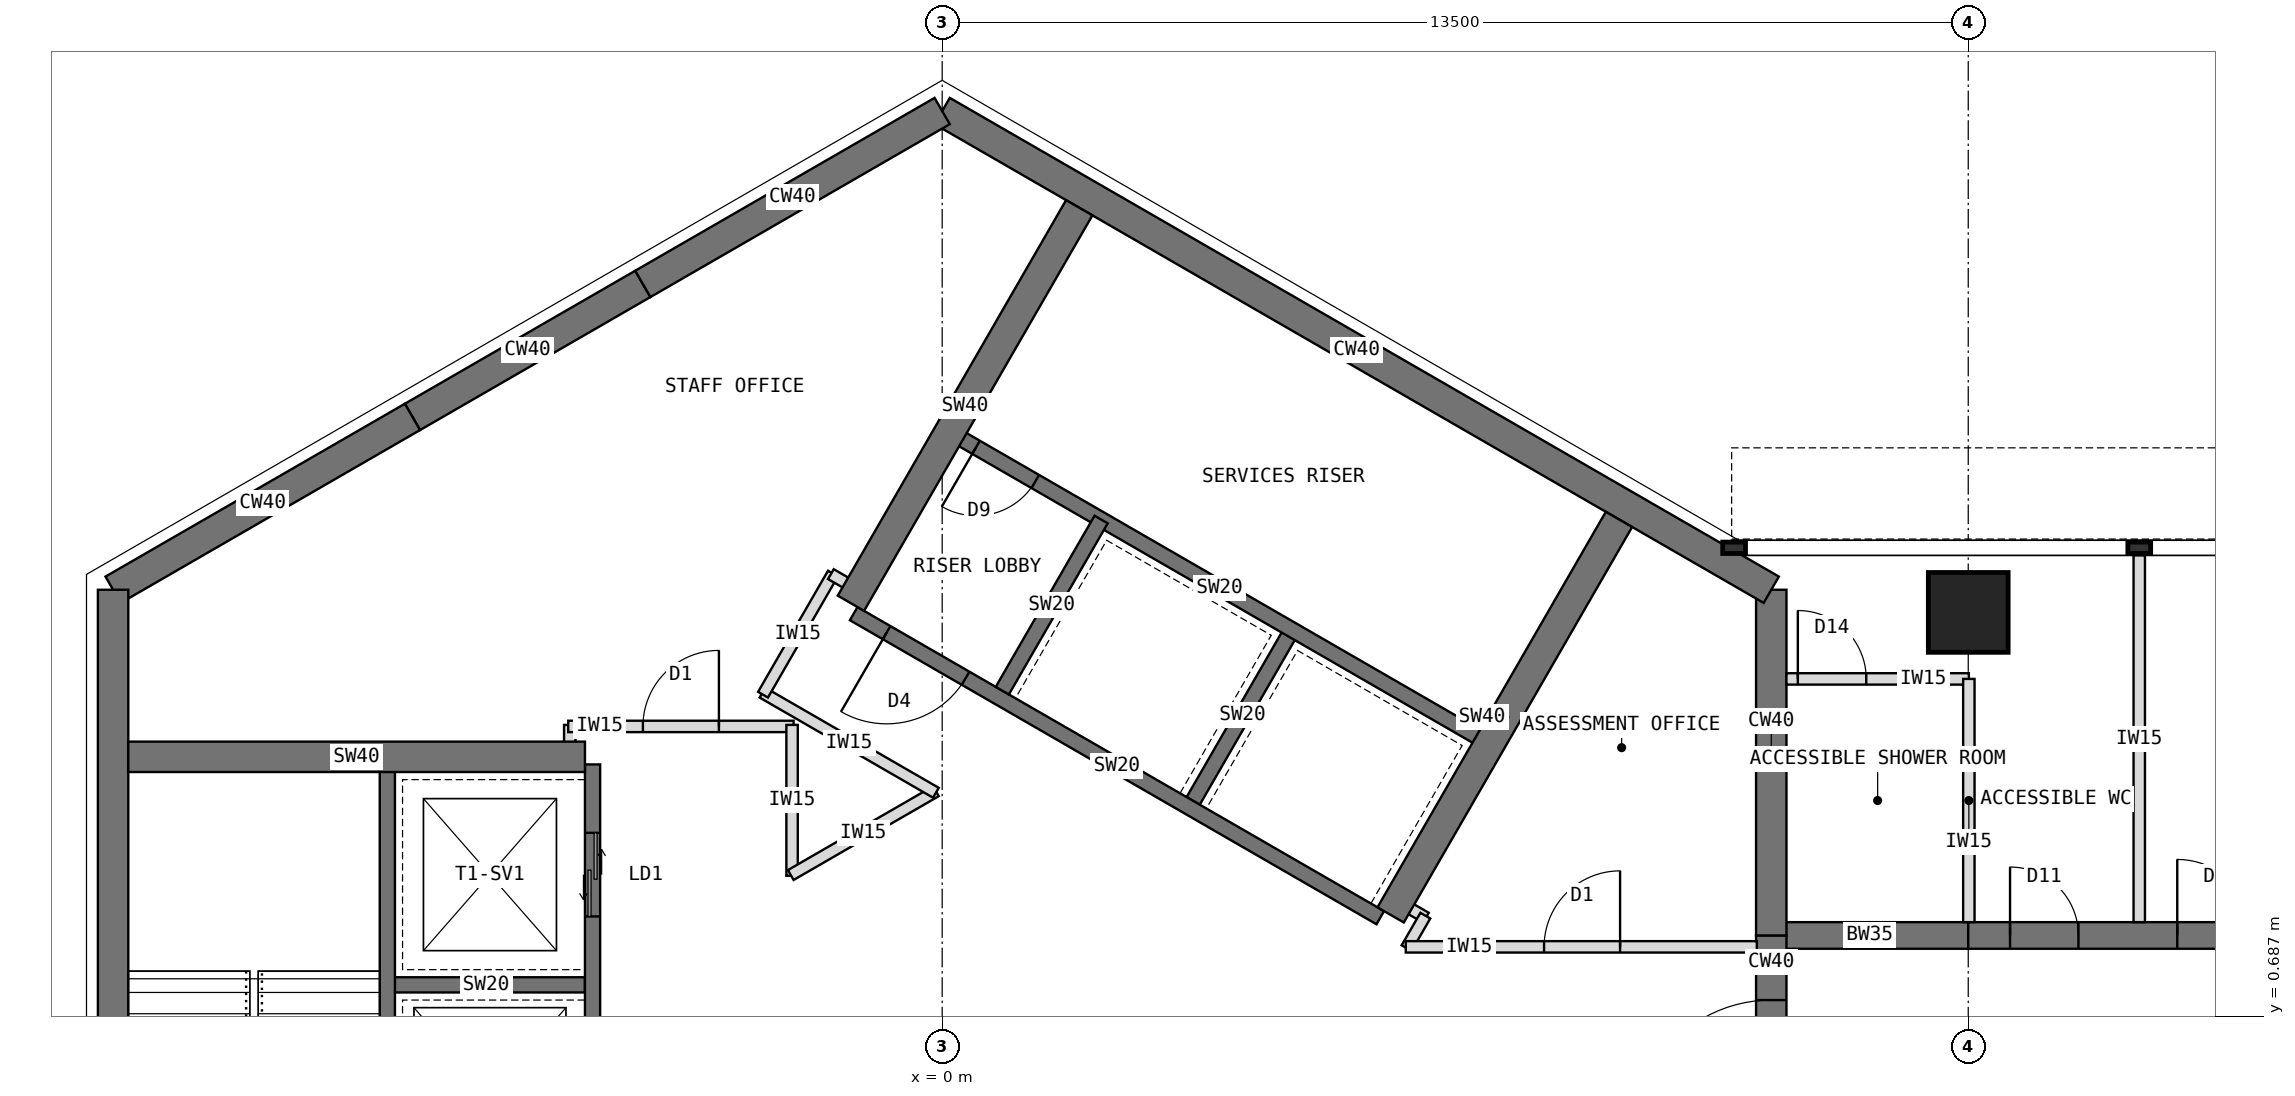
"""IFC4 building model, lengths in metres.
Left out: names, types, materials, properties, quantities, classifications, styles, units other than length and angle.
Written with IfcOpenShell. Run it as: python <this file> out.ifc"""

import sys

from ifc_helpers import new_model, si_unit, direction, frame, frame_2d, origin, origin_2d, place, context, subcontext, project, spatial, rectangle, extrude, element, fill, save


model = new_model("IFC4")
c1 = context("Model", 3, precision=1e-05, world=origin(), true_north=direction((0.0, 1.0)))
c2 = subcontext(c1, "Body", "Model", "MODEL_VIEW")
j1 = project(units=[si_unit("LENGTHUNIT", "METRE"), si_unit("PLANEANGLEUNIT", "RADIAN")], contexts=[c1])
p1 = place(None, origin())
s1 = spatial("IfcSite", under=j1, at=p1, CompositionType="ELEMENT")
p2 = place(p1, origin())
s2 = spatial("IfcBuilding", under=s1, at=p2, CompositionType="ELEMENT")
p3 = place(p2, frame((0.0, 0.0, 247.5)))
s3 = spatial("IfcBuildingStorey", under=s2, at=p3, CompositionType="ELEMENT", Elevation=247.5)
p4 = place(p3, frame((10.908, -1.75, 0.0), z_axis=(0.0, 0.0, 1.0), x_axis=(0.0, 1.0, 0.0)))
e1 = element("IfcWall", 1, at=p4, inside=s3, PredefinedType="SHEAR", context=c2, shape_type="SweptSolid", body=[
    extrude(rectangle(XDim=3.5, YDim=0.4, at=frame_2d((1.75, 0.0))), origin(), (0.0, 0.0, 1.0), 4.0),
])
p5 = place(p4, frame((0.85, 0.0, 0.0)))
e2 = element("IfcOpeningElement", 2, at=p5, cuts=e1, PredefinedType="OPENING", context=c2, shape_type="SweptSolid", body=[
    extrude(rectangle(XDim=1.8, YDim=2.1, at=frame_2d((0.9, 1.05))), frame((0.0, 0.21, 0.0), z_axis=(0.0, -1.0, 0.0), x_axis=(1.0, 0.0, 0.0)), (0.0, 0.0, 1.0), 0.42),
])
p6 = place(p3, frame((10.908, 1.75, 0.0), z_axis=(0.0, 0.0, 1.0), x_axis=(0.0, 1.0, 0.0)))
e3 = element("IfcWall", 3, at=p6, inside=s3, PredefinedType="SHEAR", context=c2, shape_type="SweptSolid", body=[
    extrude(rectangle(XDim=4.548, YDim=0.4, at=frame_2d((2.274, 0.0))), origin(), (0.0, 0.0, 1.0), 4.0),
])
p7 = place(p3, frame((10.908, 6.298, 0.0), z_axis=(0.0, 0.0, 1.0), x_axis=(-0.866021940709, 0.500005998175, 0.0)))
e4 = element("IfcWall", 4, at=p7, inside=s3, PredefinedType="SHEAR", context=c2, shape_type="SweptSolid", body=[
    extrude(rectangle(XDim=12.596, YDim=0.4, at=frame_2d((6.298, 0.0))), origin(), (0.0, 0.0, 1.0), 4.0),
])
p8 = place(p3, frame((0.0, 12.596, 0.0), z_axis=(0.0, 0.0, 1.0), x_axis=(-0.866011268655, -0.500024481964, 0.0)))
e5 = element("IfcWall", 5, at=p8, inside=s3, PredefinedType="SHEAR", context=c2, shape_type="SweptSolid", body=[
    extrude(rectangle(XDim=4.548, YDim=0.4, at=frame_2d((2.274, 0.0))), origin(), (0.0, 0.0, 1.0), 4.0),
])
p9 = place(p3, frame((-3.939, 10.322, 0.0), z_axis=(0.0, 0.0, 1.0), x_axis=(-0.866019471182, -0.500010275428, 0.0)))
e6 = element("IfcWall", 6, at=p9, inside=s3, PredefinedType="SHEAR", context=c2, shape_type="SweptSolid", body=[
    extrude(rectangle(XDim=3.5, YDim=0.4, at=frame_2d((1.75, 0.0))), origin(), (0.0, 0.0, 1.0), 4.0),
])
p10 = place(p3, frame((-6.97, 8.572, 0.0), z_axis=(0.0, 0.0, 1.0), x_axis=(-0.866034513004, -0.499984222037, 0.0)))
e7 = element("IfcWall", 7, at=p10, inside=s3, PredefinedType="SHEAR", context=c2, shape_type="SweptSolid", body=[
    extrude(rectangle(XDim=4.548, YDim=0.4, at=frame_2d((2.274, 0.0))), origin(), (0.0, 0.0, 1.0), 4.0),
])
p11 = place(p3, frame((-10.908, 6.298, 0.0), z_axis=(0.0, 0.0, 1.0), x_axis=(0.0, -1.0, 0.0)))
e8 = element("IfcWall", 8, at=p11, inside=s3, PredefinedType="SHEAR", context=c2, shape_type="SweptSolid", body=[
    extrude(rectangle(XDim=12.596, YDim=0.4, at=frame_2d((6.298, 0.0))), origin(), (0.0, 0.0, 1.0), 4.0),
])
p12 = place(p3, frame((10.908, 1.75, 0.0), z_axis=(0.0, 0.0, 1.0), x_axis=(1.0, 0.0, 0.0)))
e9 = element("IfcWall", 9, at=p12, inside=s3, PredefinedType="SHEAR", context=c2, shape_type="SweptSolid", body=[
    extrude(rectangle(XDim=2.592, YDim=0.35, at=frame_2d((1.296, 0.0))), origin(), (0.0, 0.0, 1.0), 4.0),
])
p13 = place(p3, frame((13.5, 1.75, 0.0), z_axis=(0.0, 0.0, 1.0), x_axis=(1.0, 0.0, 0.0)))
e10 = element("IfcWall", 10, at=p13, inside=s3, PredefinedType="SHEAR", context=c2, shape_type="SweptSolid", body=[
    extrude(rectangle(XDim=13.2, YDim=0.35, at=frame_2d((6.6, 0.0))), origin(), (0.0, 0.0, 1.0), 4.0),
])
p14 = place(p13, frame((0.55, 0.0, 0.0)))
e11 = element("IfcOpeningElement", 11, at=p14, cuts=e10, PredefinedType="OPENING", context=c2, shape_type="SweptSolid", body=[
    extrude(rectangle(XDim=0.9, YDim=2.1, at=frame_2d((0.45, 1.05))), frame((0.0, 0.185, 0.0), z_axis=(0.0, -1.0, 0.0), x_axis=(1.0, 0.0, 0.0)), (0.0, 0.0, 1.0), 0.37),
])
p15 = place(p13, frame((2.75, 0.0, 0.0)))
e12 = element("IfcOpeningElement", 12, at=p15, cuts=e10, PredefinedType="OPENING", context=c2, shape_type="SweptSolid", body=[
    extrude(rectangle(XDim=1.0, YDim=2.1, at=frame_2d((0.5, 1.05))), frame((0.0, 0.185, 0.0), z_axis=(0.0, -1.0, 0.0), x_axis=(1.0, 0.0, 0.0)), (0.0, 0.0, 1.0), 0.37),
])
p16 = place(p13, frame((7.25, 0.0, 0.0)))
e13 = element("IfcOpeningElement", 13, at=p16, cuts=e10, PredefinedType="OPENING", context=c2, shape_type="SweptSolid", body=[
    extrude(rectangle(XDim=1.0, YDim=2.1, at=frame_2d((0.5, 1.05))), frame((0.0, 0.185, 0.0), z_axis=(0.0, -1.0, 0.0), x_axis=(1.0, 0.0, 0.0)), (0.0, 0.0, 1.0), 0.37),
])
p17 = place(p3, frame((13.5, 6.0, 0.0), z_axis=(0.0, 0.0, 1.0), x_axis=(1.0, 0.0, 0.0)))
e14 = element("IfcColumn", 14, at=p17, inside=s3, PredefinedType="COLUMN", context=c2, shape_type="SweptSolid", body=[
    extrude(rectangle(XDim=1.05, YDim=1.05, at=origin_2d()), origin(), (0.0, 0.0, 1.0), 4.0),
])
p18 = place(p3, frame((5.764, 1.984, 0.0), z_axis=(0.0, 0.0, 1.0), x_axis=(-0.866026010844, 0.49999894854, 0.0)))
e15 = element("IfcWall", 15, at=p18, inside=s3, PredefinedType="SHEAR", context=c2, shape_type="SweptSolid", body=[
    extrude(rectangle(XDim=8.0, YDim=0.2, at=frame_2d((4.0, 0.0))), origin(), (0.0, 0.0, 1.0), 4.0),
])
p19 = place(p18, frame((6.3, 0.0, 0.0)))
e16 = element("IfcOpeningElement", 16, at=p19, cuts=e15, PredefinedType="OPENING", context=c2, shape_type="SweptSolid", body=[
    extrude(rectangle(XDim=1.2, YDim=2.1, at=frame_2d((0.6, 1.05))), frame((0.0, 0.11, 0.0), z_axis=(0.0, -1.0, 0.0), x_axis=(1.0, 0.0, 0.0)), (0.0, 0.0, 1.0), 0.22),
])
for number, where, z_axis, x_axis in (
    (17, (3.303, 3.52, 0.0), (0.0, 0.0, 1.0), (0.5, 0.866, 0.0)),
    (18, (0.791, 4.97, 0.0), (0.0, 0.0, 1.0), (0.5, 0.866, 0.0)),
):
    element("IfcWall", number, at=place(p3, frame(where, z_axis=z_axis, x_axis=x_axis)), inside=s3, PredefinedType="SHEAR", context=c2, shape_type="SweptSolid", body=[
        extrude(rectangle(XDim=2.6, YDim=0.2, at=frame_2d((1.3, 0.0))), origin(), (0.0, 0.0, 1.0), 4.0),
    ])
p20 = place(p3, frame((7.114, 4.322, 0.0), z_axis=(0.0, 0.0, 1.0), x_axis=(-0.866026010844, 0.49999894854, 0.0)))
e19 = element("IfcWall", 19, at=p20, inside=s3, PredefinedType="SHEAR", context=c2, shape_type="SweptSolid", body=[
    extrude(rectangle(XDim=8.0, YDim=0.2, at=frame_2d((4.0, 0.0))), origin(), (0.0, 0.0, 1.0), 4.0),
])
p21 = place(p20, frame((6.8, 0.0, 0.0)))
e20 = element("IfcOpeningElement", 20, at=p21, cuts=e19, PredefinedType="OPENING", context=c2, shape_type="SweptSolid", body=[
    extrude(rectangle(XDim=0.9, YDim=2.1, at=frame_2d((0.45, 1.05))), frame((0.0, 0.11, 0.0), z_axis=(0.0, -1.0, 0.0), x_axis=(1.0, 0.0, 0.0)), (0.0, 0.0, 1.0), 0.22),
])
for number, where, z_axis, x_axis in (
    (21, (-1.201, 6.12, 0.0), (0.0, 0.0, 1.0), (0.5, 0.866, 0.0)),
    (22, (5.901, 2.02, 0.0), (0.0, 0.0, 1.0), (0.5, 0.866, 0.0)),
):
    element("IfcWall", number, at=place(p3, frame(where, z_axis=z_axis, x_axis=x_axis)), inside=s3, PredefinedType="SHEAR", context=c2, shape_type="SweptSolid", body=[
        extrude(rectangle(XDim=6.008, YDim=0.4, at=frame_2d((3.004, 0.0))), origin(), (0.0, 0.0, 1.0), 4.0),
    ])
p22 = place(p3, frame((-4.6, 4.0, 0.0), z_axis=(0.0, 0.0, 1.0), x_axis=(0.0, -1.0, 0.0)))
e23 = element("IfcWall", 23, at=p22, inside=s3, PredefinedType="SHEAR", context=c2, shape_type="SweptSolid", body=[
    extrude(rectangle(XDim=8.0, YDim=0.2, at=frame_2d((4.0, 0.0))), origin(), (0.0, 0.0, 1.0), 4.0),
])
p23 = place(p22, frame((6.3, 0.0, 0.0)))
e24 = element("IfcOpeningElement", 24, at=p23, cuts=e23, PredefinedType="OPENING", context=c2, shape_type="SweptSolid", body=[
    extrude(rectangle(XDim=1.2, YDim=2.1, at=frame_2d((0.6, 1.05))), frame((0.0, 0.11, 0.0), z_axis=(0.0, -1.0, 0.0), x_axis=(1.0, 0.0, 0.0)), (0.0, 0.0, 1.0), 0.22),
])
p24 = place(p22, frame((0.9, 0.0, 0.0)))
e25 = element("IfcOpeningElement", 25, at=p24, cuts=e23, PredefinedType="OPENING", context=c2, shape_type="SweptSolid", body=[
    extrude(rectangle(XDim=1.1, YDim=2.2, at=frame_2d((0.55, 1.1))), frame((0.0, 0.11, 0.0), z_axis=(0.0, -1.0, 0.0), x_axis=(1.0, 0.0, 0.0)), (0.0, 0.0, 1.0), 0.22),
])
p25 = place(p3, frame((-4.7, 1.1, 0.0), z_axis=(0.0, 0.0, 1.0), x_axis=(-1.0, 0.0, 0.0)))
e26 = element("IfcWall", 26, at=p25, inside=s3, PredefinedType="SHEAR", context=c2, shape_type="SweptSolid", body=[
    extrude(rectangle(XDim=2.6, YDim=0.2, at=frame_2d((1.3, 0.0))), origin(), (0.0, 0.0, 1.0), 4.0),
])
p26 = place(p3, frame((-7.3, 4.0, 0.0), z_axis=(0.0, 0.0, 1.0), x_axis=(0.0, -1.0, 0.0)))
e27 = element("IfcWall", 27, at=p26, inside=s3, PredefinedType="SHEAR", context=c2, shape_type="SweptSolid", body=[
    extrude(rectangle(XDim=8.0, YDim=0.2, at=frame_2d((4.0, 0.0))), origin(), (0.0, 0.0, 1.0), 4.0),
])
p27 = place(p26, frame((6.7, 0.0, 0.0)))
e28 = element("IfcOpeningElement", 28, at=p27, cuts=e27, PredefinedType="OPENING", context=c2, shape_type="SweptSolid", body=[
    extrude(rectangle(XDim=1.1, YDim=2.1, at=frame_2d((0.55, 1.05))), frame((0.0, 0.11, 0.0), z_axis=(0.0, -1.0, 0.0), x_axis=(1.0, 0.0, 0.0)), (0.0, 0.0, 1.0), 0.22),
])
p28 = place(p3, frame((-4.7, 4.1, 0.0), z_axis=(0.0, 0.0, 1.0), x_axis=(-1.0, 0.0, 0.0)))
e29 = element("IfcWall", 29, at=p28, inside=s3, PredefinedType="SHEAR", context=c2, shape_type="SweptSolid", body=[
    extrude(rectangle(XDim=6.008, YDim=0.4, at=frame_2d((3.004, 0.0))), origin(), (0.0, 0.0, 1.0), 4.0),
])
p29 = place(p3, frame((15.75, 1.925, 0.0), z_axis=(0.0, 0.0, 1.0), x_axis=(0.0, 1.0, 0.0)))
e30 = element("IfcWall", 30, at=p29, inside=s3, PredefinedType="PARTITIONING", context=c2, shape_type="SweptSolid", body=[
    extrude(rectangle(XDim=4.825, YDim=0.15, at=frame_2d((2.413, 0.0))), origin(), (0.0, 0.0, 1.0), 3.8),
])
p30 = place(p3, frame((11.108, 5.125, 0.0), z_axis=(0.0, 0.0, 1.0), x_axis=(1.0, 0.0, 0.0)))
e31 = element("IfcWall", 31, at=p30, inside=s3, PredefinedType="PARTITIONING", context=c2, shape_type="SweptSolid", body=[
    extrude(rectangle(XDim=2.4, YDim=0.15, at=frame_2d((1.2, 0.0))), origin(), (0.0, 0.0, 1.0), 3.8),
])
p31 = place(p30, frame((0.15, 0.0, 0.0)))
e32 = element("IfcOpeningElement", 32, at=p31, cuts=e31, PredefinedType="OPENING", context=c2, shape_type="SweptSolid", body=[
    extrude(rectangle(XDim=0.9, YDim=2.1, at=frame_2d((0.45, 1.05))), frame((0.0, 0.085, 0.0), z_axis=(0.0, -1.0, 0.0), x_axis=(1.0, 0.0, 0.0)), (0.0, 0.0, 1.0), 0.17),
])
p32 = place(p3, frame((13.508, 1.925, 0.0), z_axis=(0.0, 0.0, 1.0), x_axis=(0.0, 1.0, 0.0)))
e33 = element("IfcWall", 33, at=p32, inside=s3, PredefinedType="PARTITIONING", context=c2, shape_type="SweptSolid", body=[
    extrude(rectangle(XDim=3.2, YDim=0.15, at=frame_2d((1.6, 0.0))), origin(), (0.0, 0.0, 1.0), 3.267),
])
p33 = place(p3, frame((-4.9, 4.09, 0.0), z_axis=(0.0, 0.0, 1.0), x_axis=(0.0, 1.0, 0.0)))
e34 = element("IfcWall", 34, at=p33, inside=s3, PredefinedType="PARTITIONING", context=c2, shape_type="SweptSolid", body=[
    extrude(rectangle(XDim=0.43, YDim=0.15, at=frame_2d((0.215, 0.0))), origin(), (0.0, 0.0, 1.0), 3.8),
])
p34 = place(p3, frame((-4.92, 4.5, 0.0), z_axis=(0.0, 0.0, 1.0), x_axis=(1.0, 0.0, 0.0)))
e35 = element("IfcWall", 35, at=p34, inside=s3, PredefinedType="PARTITIONING", context=c2, shape_type="SweptSolid", body=[
    extrude(rectangle(XDim=2.965, YDim=0.15, at=frame_2d((1.482, 0.0))), origin(), (0.0, 0.0, 1.0), 3.8),
])
p35 = place(p34, frame((0.982, 0.0, 0.0)))
e36 = element("IfcOpeningElement", 36, at=p35, cuts=e35, PredefinedType="OPENING", context=c2, shape_type="SweptSolid", body=[
    extrude(rectangle(XDim=1.0, YDim=2.1, at=frame_2d((0.5, 1.05))), frame((0.0, 0.085, 0.0), z_axis=(0.0, -1.0, 0.0), x_axis=(1.0, 0.0, 0.0)), (0.0, 0.0, 1.0), 0.17),
])
p36 = place(p3, frame((-1.975, 4.52, 0.0), z_axis=(0.0, 0.0, 1.0), x_axis=(0.0, -1.0, 0.0)))
e37 = element("IfcWall", 37, at=p36, inside=s3, PredefinedType="PARTITIONING", context=c2, shape_type="SweptSolid", body=[
    extrude(rectangle(XDim=1.985, YDim=0.15, at=frame_2d((0.993, 0.0))), origin(), (0.0, 0.0, 1.0), 3.8),
])
p37 = place(p3, frame((-1.992, 2.545, 0.0), z_axis=(0.0, 0.0, 1.0), x_axis=(0.866074964767, 0.499914148034, 0.0)))
e38 = element("IfcWall", 38, at=p37, inside=s3, PredefinedType="PARTITIONING", context=c2, shape_type="SweptSolid", body=[
    extrude(rectangle(XDim=2.205, YDim=0.15, at=frame_2d((1.103, 0.0))), origin(), (0.0, 0.0, 1.0), 3.8),
])
p38 = place(p3, frame((-0.083, 3.627, 0.0), z_axis=(0.0, 0.0, 1.0), x_axis=(-0.866022017938, 0.500005864412, 0.0)))
e39 = element("IfcWall", 39, at=p38, inside=s3, PredefinedType="PARTITIONING", context=c2, shape_type="SweptSolid", body=[
    extrude(rectangle(XDim=2.635, YDim=0.15, at=frame_2d((1.317, 0.0))), origin(), (0.0, 0.0, 1.0), 3.8),
])
p39 = place(p3, frame((-2.357, 4.917, 0.0), z_axis=(0.0, 0.0, 1.0), x_axis=(0.500120627516, 0.865955748254, 0.0)))
e40 = element("IfcWall", 40, at=p39, inside=s3, PredefinedType="PARTITIONING", context=c2, shape_type="SweptSolid", body=[
    extrude(rectangle(XDim=1.84, YDim=0.15, at=frame_2d((0.92, 0.0))), origin(), (0.0, 0.0, 1.0), 3.8),
])
for number, where, z_axis, x_axis in (
    (41, (-1.464, 6.503, 0.0), (0.0, 0.0, 1.0), (0.866, -0.5, 0.0)),
    (42, (5.992, 2.198, 0.0), (0.0, 0.0, 1.0), (0.866, -0.5, 0.0)),
):
    element("IfcWall", number, at=place(p3, frame(where, z_axis=z_axis, x_axis=x_axis)), inside=s3, PredefinedType="PARTITIONING", context=c2, shape_type="SweptSolid", body=[
        extrude(rectangle(XDim=0.43, YDim=0.15, at=frame_2d((0.215, 0.0))), origin(), (0.0, 0.0, 1.0), 3.8),
    ])
p40 = place(p3, frame((6.357, 2.011, 0.0), z_axis=(0.0, 0.0, 1.0), x_axis=(-0.50033519877, -0.865831790172, 0.0)))
e43 = element("IfcWall", 43, at=p40, inside=s3, PredefinedType="PARTITIONING", context=c2, shape_type="SweptSolid", body=[
    extrude(rectangle(XDim=0.494, YDim=0.15, at=frame_2d((0.247, 0.0))), origin(), (0.0, 0.0, 1.0), 3.8),
])
p41 = place(p3, frame((6.1, 1.6, 0.0), z_axis=(0.0, 0.0, 1.0), x_axis=(1.0, 0.0, 0.0)))
e44 = element("IfcWall", 44, at=p41, inside=s3, PredefinedType="PARTITIONING", context=c2, shape_type="SweptSolid", body=[
    extrude(rectangle(XDim=4.618, YDim=0.15, at=frame_2d((2.309, 0.0))), origin(), (0.0, 0.0, 1.0), 3.8),
])
p42 = place(p41, frame((1.819, 0.0, 0.0)))
e45 = element("IfcOpeningElement", 45, at=p42, cuts=e44, PredefinedType="OPENING", context=c2, shape_type="SweptSolid", body=[
    extrude(rectangle(XDim=1.0, YDim=2.1, at=frame_2d((0.5, 1.05))), frame((0.0, 0.085, 0.0), z_axis=(0.0, -1.0, 0.0), x_axis=(1.0, 0.0, 0.0)), (0.0, 0.0, 1.0), 0.17),
])
p43 = place(p19, origin())
e46 = element("IfcDoor", 46, at=p43, inside=s3, OperationType="SINGLE_SWING_RIGHT", PredefinedType="DOOR", context=c2, shape_type="SweptSolid", body=[
    extrude(rectangle(XDim=1.2, YDim=2.1, at=frame_2d((0.6, 1.05))), frame((0.0, 0.025, 0.0), z_axis=(0.0, -1.0, 0.0), x_axis=(1.0, 0.0, 0.0)), (0.0, 0.0, 1.0), 0.05),
])
fill(e16, e46)
p44 = place(p21, origin())
e47 = element("IfcDoor", 47, at=p44, inside=s3, OperationType="SINGLE_SWING_RIGHT", PredefinedType="DOOR", context=c2, shape_type="SweptSolid", body=[
    extrude(rectangle(XDim=0.9, YDim=2.1, at=frame_2d((0.45, 1.05))), frame((0.0, 0.025, 0.0), z_axis=(0.0, -1.0, 0.0), x_axis=(1.0, 0.0, 0.0)), (0.0, 0.0, 1.0), 0.05),
])
fill(e20, e47)
p45 = place(p24, origin())
e48 = element("IfcDoor", 48, at=p45, inside=s3, OperationType="DOUBLE_DOOR_SLIDING", PredefinedType="DOOR", context=c2, shape_type="SweptSolid", body=[
    extrude(rectangle(XDim=1.1, YDim=2.2, at=frame_2d((0.55, 1.1))), frame((0.0, 0.025, 0.0), z_axis=(0.0, -1.0, 0.0), x_axis=(1.0, 0.0, 0.0)), (0.0, 0.0, 1.0), 0.05),
])
fill(e25, e48)
p46 = place(p5, origin())
e49 = element("IfcDoor", 49, at=p46, inside=s3, OperationType="DOUBLE_DOOR_DOUBLE_SWING", PredefinedType="DOOR", context=c2, shape_type="SweptSolid", body=[
    extrude(rectangle(XDim=1.8, YDim=2.1, at=frame_2d((0.9, 1.05))), frame((0.0, 0.025, 0.0), z_axis=(0.0, -1.0, 0.0), x_axis=(1.0, 0.0, 0.0)), (0.0, 0.0, 1.0), 0.05),
])
fill(e2, e49)
p47 = place(p31, origin())
e50 = element("IfcDoor", 50, at=p47, inside=s3, OperationType="SINGLE_SWING_LEFT", PredefinedType="DOOR", context=c2, shape_type="SweptSolid", body=[
    extrude(rectangle(XDim=0.9, YDim=2.1, at=frame_2d((0.45, 1.05))), frame((0.0, 0.025, 0.0), z_axis=(0.0, -1.0, 0.0), x_axis=(1.0, 0.0, 0.0)), (0.0, 0.0, 1.0), 0.05),
])
fill(e32, e50)
p48 = place(p42, origin())
e51 = element("IfcDoor", 51, at=p48, inside=s3, OperationType="SINGLE_SWING_RIGHT", PredefinedType="DOOR", context=c2, shape_type="SweptSolid", body=[
    extrude(rectangle(XDim=1.0, YDim=2.1, at=frame_2d((0.5, 1.05))), frame((0.0, 0.025, 0.0), z_axis=(0.0, -1.0, 0.0), x_axis=(1.0, 0.0, 0.0)), (0.0, 0.0, 1.0), 0.05),
])
fill(e45, e51)
p49 = place(p35, origin())
e52 = element("IfcDoor", 52, at=p49, inside=s3, OperationType="SINGLE_SWING_RIGHT", PredefinedType="DOOR", context=c2, shape_type="SweptSolid", body=[
    extrude(rectangle(XDim=1.0, YDim=2.1, at=frame_2d((0.5, 1.05))), frame((0.0, 0.025, 0.0), z_axis=(0.0, -1.0, 0.0), x_axis=(1.0, 0.0, 0.0)), (0.0, 0.0, 1.0), 0.05),
])
fill(e36, e52)
p50 = place(p14, origin())
e53 = element("IfcDoor", 53, at=p50, inside=s3, OperationType="SINGLE_SWING_LEFT", PredefinedType="DOOR", context=c2, shape_type="SweptSolid", body=[
    extrude(rectangle(XDim=0.9, YDim=2.1, at=frame_2d((0.45, 1.05))), frame((0.0, 0.025, 0.0), z_axis=(0.0, -1.0, 0.0), x_axis=(1.0, 0.0, 0.0)), (0.0, 0.0, 1.0), 0.05),
])
fill(e11, e53)
p51 = place(p15, origin())
e54 = element("IfcDoor", 54, at=p51, inside=s3, OperationType="SINGLE_SWING_LEFT", PredefinedType="DOOR", context=c2, shape_type="SweptSolid", body=[
    extrude(rectangle(XDim=1.0, YDim=2.1, at=frame_2d((0.5, 1.05))), frame((0.0, 0.025, 0.0), z_axis=(0.0, -1.0, 0.0), x_axis=(1.0, 0.0, 0.0)), (0.0, 0.0, 1.0), 0.05),
])
fill(e12, e54)
save(model, sys.argv[1])
